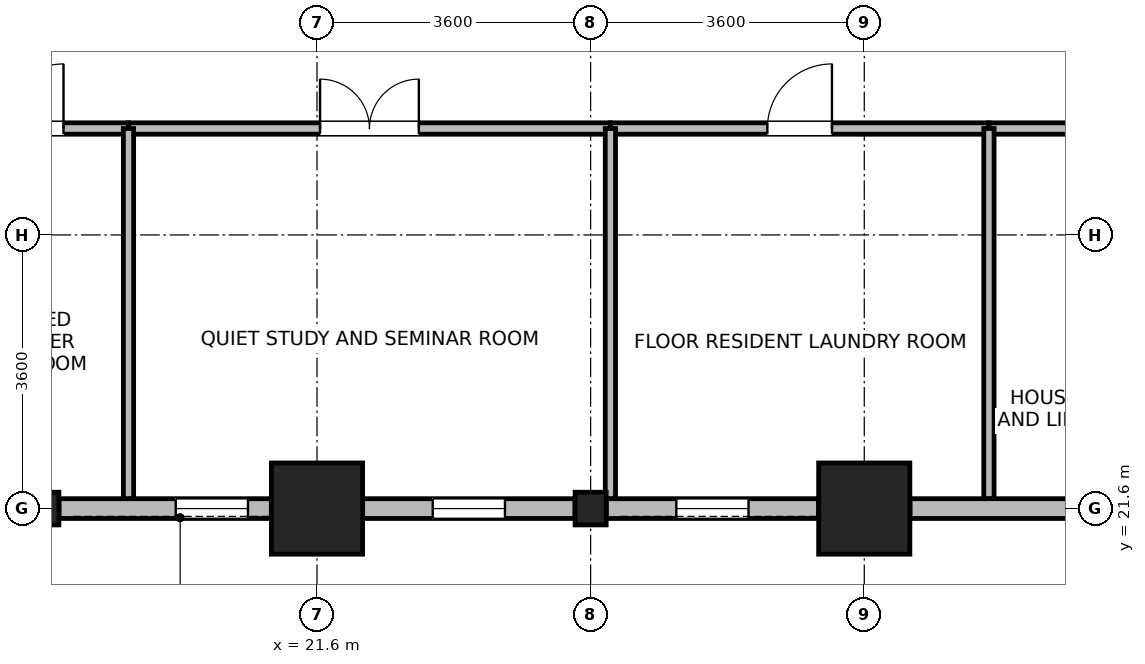
"""IFC4 building model, lengths in metres.
Left out: names, types, materials, properties, quantities, classifications, styles, units other than length and angle.
Written with IfcOpenShell. Run it as: python <this file> out.ifc"""

import sys

from ifc_helpers import new_model, si_unit, direction, frame, frame_2d, origin, origin_2d, place, context, subcontext, project, spatial, rectangle, i_section, extrude, source, transform, mapped, element, fill, save


model = new_model("IFC4")
c1 = context("Model", 3, precision=1e-05, world=origin(), true_north=direction((0.0, 1.0)))
c2 = subcontext(c1, "Body", "Model", "MODEL_VIEW")
j1 = project(units=[si_unit("LENGTHUNIT", "METRE"), si_unit("PLANEANGLEUNIT", "RADIAN")], contexts=[c1])
p1 = place(None, origin())
s1 = spatial("IfcSite", under=j1, at=p1, CompositionType="ELEMENT")
p2 = place(p1, origin())
s2 = spatial("IfcBuilding", under=s1, at=p2, CompositionType="ELEMENT")
p3 = place(p2, frame((0.0, 0.0, 119.3)))
s3 = spatial("IfcBuildingStorey", under=s2, at=p3, CompositionType="ELEMENT", Elevation=119.3)
m1 = source(origin(), c2, "Body", "SweptSolid", [
    extrude(rectangle(XDim=1.2, YDim=1.2, at=origin_2d()), origin(), (0.0, 0.0, 1.0), 3.7),
])
for number, where, z_axis, x_axis in (
    (1, (21.6, 21.6, 0.0), (0.0, 0.0, 1.0), (1.0, 0.0, 0.0)),
    (2, (28.8, 21.6, 0.0), (0.0, 0.0, 1.0), (1.0, 0.0, 0.0)),
):
    element("IfcColumn", number, at=place(p3, frame(where, z_axis=z_axis, x_axis=x_axis)), inside=s3, PredefinedType="COLUMN", context=c2, shape_type="MappedRepresentation", body=[
        mapped(m1, transform((0.0, 0.0, 0.0), x_axis=(1.0, 0.0, 0.0), y_axis=(0.0, 1.0, 0.0), z_axis=(0.0, 0.0, 1.0), scale=1.0)),
    ])
m2 = source(origin(), c2, "Body", "SweptSolid", [
    extrude(i_section(OverallWidth=0.409, OverallDepth=0.43, WebThickness=0.024, FlangeThickness=0.033, FilletRadius=0.015, at=origin_2d()), origin(), (0.0, 0.0, 1.0), 3.7),
])
for number, where, z_axis, x_axis in (
    (3, (18.0, 21.6, 0.0), (0.0, 0.0, 1.0), (1.0, 0.0, 0.0)),
    (4, (25.2, 21.6, 0.0), (0.0, 0.0, 1.0), (1.0, 0.0, 0.0)),
):
    element("IfcColumn", number, at=place(p3, frame(where, z_axis=z_axis, x_axis=x_axis)), inside=s3, PredefinedType="COLUMN", context=c2, shape_type="MappedRepresentation", body=[
        mapped(m2, transform((0.0, 0.0, 0.0), x_axis=(1.0, 0.0, 0.0), y_axis=(0.0, 1.0, 0.0), z_axis=(0.0, 0.0, 1.0), scale=1.0)),
    ])
p4 = place(p3, frame((20.999, 21.6, 0.0), z_axis=(0.0, 0.0, 1.0), x_axis=(-1.0, 0.0, 0.0)))
e5 = element("IfcWall", 5, at=p4, inside=s3, PredefinedType="STANDARD", context=c2, shape_type="SweptSolid", body=[
    extrude(rectangle(XDim=2.793, YDim=0.26, at=frame_2d((1.397, 0.0))), origin(), (0.0, 0.0, 1.0), 2.98),
])
p5 = place(p4, frame((0.307, 0.0, 0.85)))
e6 = element("IfcOpeningElement", 6, at=p5, cuts=e5, PredefinedType="OPENING", context=c2, shape_type="SweptSolid", body=[
    extrude(rectangle(XDim=0.95, YDim=1.75, at=frame_2d((0.475, 0.875))), frame((0.0, 0.14, 0.0), z_axis=(0.0, -1.0, 0.0), x_axis=(1.0, 0.0, 0.0)), (0.0, 0.0, 1.0), 0.28),
])
p6 = place(p3, frame((24.994, 21.6, 0.0), z_axis=(0.0, 0.0, 1.0), x_axis=(-1.0, 0.0, 0.0)))
e7 = element("IfcWall", 7, at=p6, inside=s3, PredefinedType="STANDARD", context=c2, shape_type="SweptSolid", body=[
    extrude(rectangle(XDim=2.793, YDim=0.26, at=frame_2d((1.397, 0.0))), origin(), (0.0, 0.0, 1.0), 2.98),
])
p7 = place(p6, frame((0.922, 0.0, 0.85)))
e8 = element("IfcOpeningElement", 8, at=p7, cuts=e7, PredefinedType="OPENING", context=c2, shape_type="SweptSolid", body=[
    extrude(rectangle(XDim=0.95, YDim=1.75, at=frame_2d((0.475, 0.875))), frame((0.0, 0.14, 0.0), z_axis=(0.0, -1.0, 0.0), x_axis=(1.0, 0.0, 0.0)), (0.0, 0.0, 1.0), 0.28),
])
p8 = place(p3, frame((28.199, 21.6, 0.0), z_axis=(0.0, 0.0, 1.0), x_axis=(-1.0, 0.0, 0.0)))
e9 = element("IfcWall", 9, at=p8, inside=s3, PredefinedType="STANDARD", context=c2, shape_type="SweptSolid", body=[
    extrude(rectangle(XDim=2.793, YDim=0.26, at=frame_2d((1.397, 0.0))), origin(), (0.0, 0.0, 1.0), 2.98),
])
p9 = place(p8, frame((0.922, 0.0, 0.85)))
e10 = element("IfcOpeningElement", 10, at=p9, cuts=e9, PredefinedType="OPENING", context=c2, shape_type="SweptSolid", body=[
    extrude(rectangle(XDim=0.95, YDim=1.75, at=frame_2d((0.475, 0.875))), frame((0.0, 0.14, 0.0), z_axis=(0.0, -1.0, 0.0), x_axis=(1.0, 0.0, 0.0)), (0.0, 0.0, 1.0), 0.28),
])
p10 = place(p3, frame((31.765, 21.6, 0.0), z_axis=(0.0, 0.0, 1.0), x_axis=(-1.0, 0.0, 0.0)))
e11 = element("IfcWall", 11, at=p10, inside=s3, PredefinedType="STANDARD", context=c2, shape_type="SweptSolid", body=[
    extrude(rectangle(XDim=2.364, YDim=0.26, at=frame_2d((1.182, 0.0))), origin(), (0.0, 0.0, 1.0), 2.98),
])
p11 = place(p3, frame((19.12, 26.6, 0.0), z_axis=(0.0, 0.0, 1.0), x_axis=(1.0, 0.0, 0.0)))
e12 = element("IfcWall", 12, at=p11, inside=s3, PredefinedType="PARTITIONING", context=c2, shape_type="SweptSolid", body=[
    extrude(rectangle(XDim=6.34, YDim=0.15, at=frame_2d((3.17, 0.0))), origin(), (0.0, 0.0, 1.0), 3.43),
])
p12 = place(p11, frame((2.52, 0.0, 0.0)))
e13 = element("IfcOpeningElement", 13, at=p12, cuts=e12, PredefinedType="OPENING", context=c2, shape_type="SweptSolid", body=[
    extrude(rectangle(XDim=1.3, YDim=2.12, at=frame_2d((0.65, 1.06))), frame((0.0, 0.085, 0.0), z_axis=(0.0, -1.0, 0.0), x_axis=(1.0, 0.0, 0.0)), (0.0, 0.0, 1.0), 0.17),
])
p13 = place(p3, frame((25.46, 26.6, 0.0), z_axis=(0.0, 0.0, 1.0), x_axis=(1.0, 0.0, 0.0)))
e14 = element("IfcWall", 14, at=p13, inside=s3, PredefinedType="PARTITIONING", context=c2, shape_type="SweptSolid", body=[
    extrude(rectangle(XDim=4.98, YDim=0.15, at=frame_2d((2.49, 0.0))), origin(), (0.0, 0.0, 1.0), 3.43),
])
p14 = place(p13, frame((2.065, 0.0, 0.0)))
e15 = element("IfcOpeningElement", 15, at=p14, cuts=e14, PredefinedType="OPENING", context=c2, shape_type="SweptSolid", body=[
    extrude(rectangle(XDim=0.85, YDim=2.04, at=frame_2d((0.425, 1.02))), frame((0.0, 0.085, 0.0), z_axis=(0.0, -1.0, 0.0), x_axis=(1.0, 0.0, 0.0)), (0.0, 0.0, 1.0), 0.17),
])
p15 = place(p3, frame((30.44, 26.6, 0.0), z_axis=(0.0, 0.0, 1.0), x_axis=(1.0, 0.0, 0.0)))
e16 = element("IfcWall", 16, at=p15, inside=s3, PredefinedType="PARTITIONING", context=c2, shape_type="SweptSolid", body=[
    extrude(rectangle(XDim=2.92, YDim=0.15, at=frame_2d((1.46, 0.0))), origin(), (0.0, 0.0, 1.0), 3.43),
])
p16 = place(p3, frame((16.56, 26.6, 0.0), z_axis=(0.0, 0.0, 1.0), x_axis=(1.0, 0.0, 0.0)))
e17 = element("IfcWall", 17, at=p16, inside=s3, PredefinedType="PARTITIONING", context=c2, shape_type="SweptSolid", body=[
    extrude(rectangle(XDim=2.56, YDim=0.15, at=frame_2d((1.28, 0.0))), origin(), (0.0, 0.0, 1.0), 3.43),
])
p17 = place(p16, frame((0.855, 0.0, 0.0)))
e18 = element("IfcOpeningElement", 18, at=p17, cuts=e17, PredefinedType="OPENING", context=c2, shape_type="SweptSolid", body=[
    extrude(rectangle(XDim=0.85, YDim=2.04, at=frame_2d((0.425, 1.02))), frame((0.0, 0.085, 0.0), z_axis=(0.0, -1.0, 0.0), x_axis=(1.0, 0.0, 0.0)), (0.0, 0.0, 1.0), 0.17),
])
for number, where, z_axis, x_axis in (
    (19, (19.12, 21.732, 0.0), (0.0, 0.0, 1.0), (0.0, 1.0, 0.0)),
    (20, (25.46, 21.732, 0.0), (0.0, 0.0, 1.0), (0.0, 1.0, 0.0)),
    (21, (30.44, 21.732, 0.0), (0.0, 0.0, 1.0), (0.0, 1.0, 0.0)),
):
    element("IfcWall", number, at=place(p3, frame(where, z_axis=z_axis, x_axis=x_axis)), inside=s3, PredefinedType="PARTITIONING", context=c2, shape_type="SweptSolid", body=[
        extrude(rectangle(XDim=4.868, YDim=0.135, at=frame_2d((2.434, 0.0))), origin(), (0.0, 0.0, 1.0), 3.43),
    ])
p18 = place(p5, origin())
e22 = element("IfcWindow", 22, at=p18, inside=s3, PartitioningType="SINGLE_PANEL", PredefinedType="WINDOW", context=c2, shape_type="SweptSolid", body=[
    extrude(rectangle(XDim=0.95, YDim=1.75, at=frame_2d((0.475, 0.875))), frame((0.0, 0.03, 0.0), z_axis=(0.0, -1.0, 0.0), x_axis=(1.0, 0.0, 0.0)), (0.0, 0.0, 1.0), 0.06),
])
fill(e6, e22)
p19 = place(p7, origin())
e23 = element("IfcWindow", 23, at=p19, inside=s3, PartitioningType="SINGLE_PANEL", PredefinedType="WINDOW", context=c2, shape_type="SweptSolid", body=[
    extrude(rectangle(XDim=0.95, YDim=1.75, at=frame_2d((0.475, 0.875))), frame((0.0, 0.03, 0.0), z_axis=(0.0, -1.0, 0.0), x_axis=(1.0, 0.0, 0.0)), (0.0, 0.0, 1.0), 0.06),
])
fill(e8, e23)
p20 = place(p9, origin())
e24 = element("IfcWindow", 24, at=p20, inside=s3, PartitioningType="SINGLE_PANEL", PredefinedType="WINDOW", context=c2, shape_type="SweptSolid", body=[
    extrude(rectangle(XDim=0.95, YDim=1.75, at=frame_2d((0.475, 0.875))), frame((0.0, 0.03, 0.0), z_axis=(0.0, -1.0, 0.0), x_axis=(1.0, 0.0, 0.0)), (0.0, 0.0, 1.0), 0.06),
])
fill(e10, e24)
p21 = place(p12, origin())
e25 = element("IfcDoor", 25, at=p21, inside=s3, OperationType="DOUBLE_DOOR_SINGLE_SWING", PredefinedType="DOOR", context=c2, shape_type="SweptSolid", body=[
    extrude(rectangle(XDim=1.3, YDim=2.12, at=frame_2d((0.65, 1.06))), frame((0.0, 0.025, 0.0), z_axis=(0.0, -1.0, 0.0), x_axis=(1.0, 0.0, 0.0)), (0.0, 0.0, 1.0), 0.05),
])
fill(e13, e25)
p22 = place(p14, origin())
e26 = element("IfcDoor", 26, at=p22, inside=s3, OperationType="SINGLE_SWING_RIGHT", PredefinedType="DOOR", context=c2, shape_type="SweptSolid", body=[
    extrude(rectangle(XDim=0.85, YDim=2.04, at=frame_2d((0.425, 1.02))), frame((0.0, 0.025, 0.0), z_axis=(0.0, -1.0, 0.0), x_axis=(1.0, 0.0, 0.0)), (0.0, 0.0, 1.0), 0.05),
])
fill(e15, e26)
p23 = place(p17, origin())
e27 = element("IfcDoor", 27, at=p23, inside=s3, OperationType="SINGLE_SWING_RIGHT", PredefinedType="DOOR", context=c2, shape_type="SweptSolid", body=[
    extrude(rectangle(XDim=0.85, YDim=2.04, at=frame_2d((0.425, 1.02))), frame((0.0, 0.025, 0.0), z_axis=(0.0, -1.0, 0.0), x_axis=(1.0, 0.0, 0.0)), (0.0, 0.0, 1.0), 0.05),
])
fill(e18, e27)
save(model, sys.argv[1])
